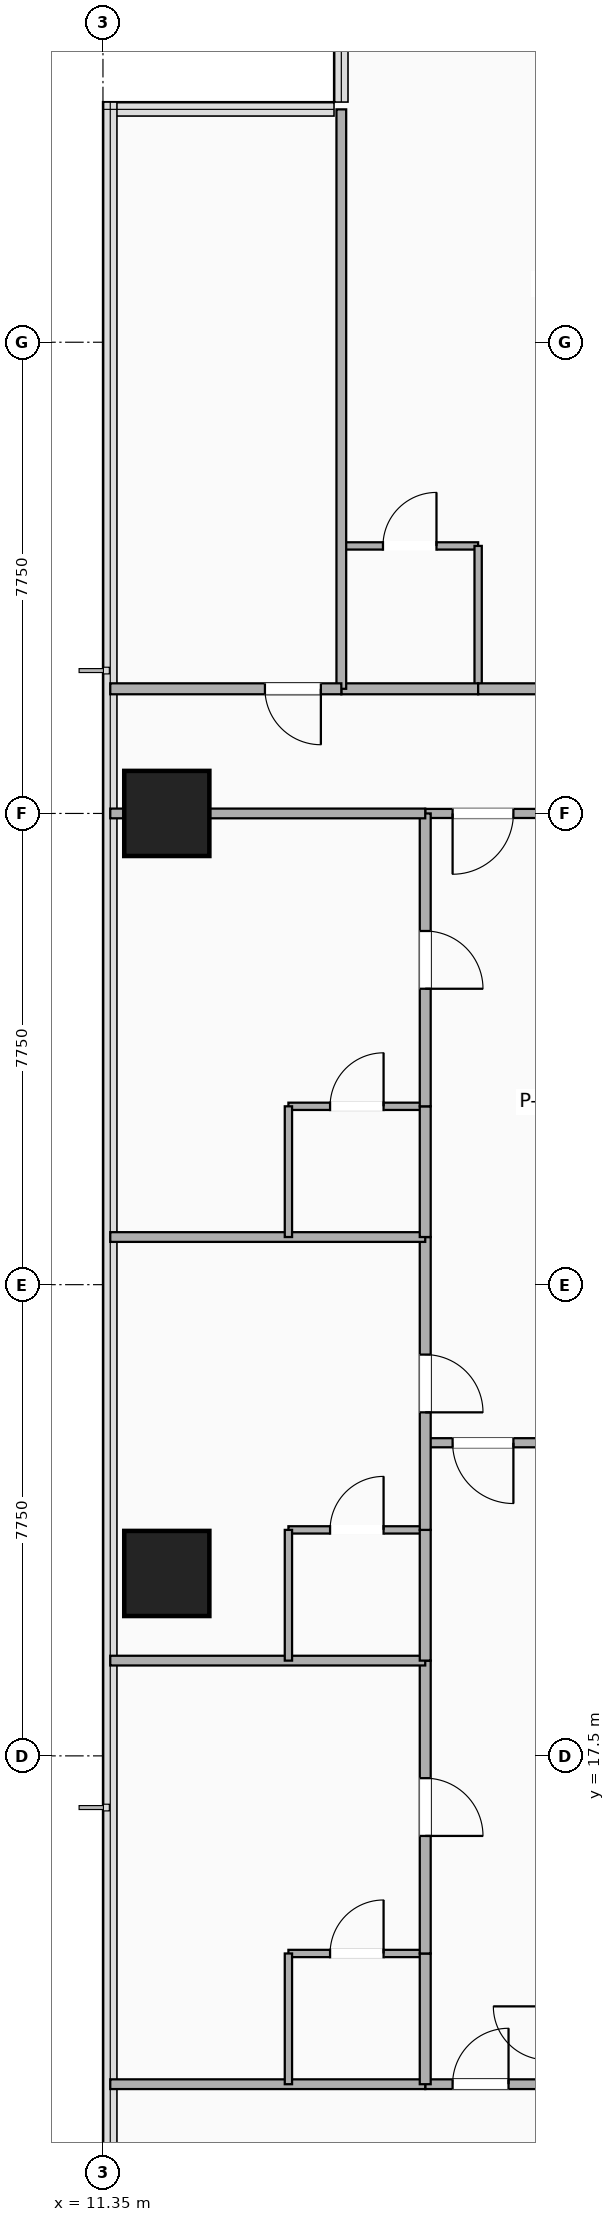
"""IFC4 building model, lengths in metres.
Left out: names, types, materials, properties, quantities, classifications, styles, units other than length and angle.
Written with IfcOpenShell. Run it as: python <this file> out.ifc"""

import sys

from ifc_helpers import new_model, si_unit, direction, frame, frame_2d, origin, origin_2d, place, context, subcontext, project, spatial, rectangle, extrude, element, fill, save


model = new_model("IFC4")
c1 = context("Model", 3, precision=1e-05, world=origin(), true_north=direction((0.0, 1.0)))
c2 = subcontext(c1, "Body", "Model", "MODEL_VIEW")
j1 = project(units=[si_unit("LENGTHUNIT", "METRE"), si_unit("PLANEANGLEUNIT", "RADIAN")], contexts=[c1])
p1 = place(None, origin())
s1 = spatial("IfcSite", under=j1, at=p1, CompositionType="ELEMENT")
p2 = place(p1, origin())
s2 = spatial("IfcBuilding", under=s1, at=p2, CompositionType="ELEMENT")
p3 = place(p2, frame((0.0, 0.0, 71.9)))
s3 = spatial("IfcBuildingStorey", under=s2, at=p3, CompositionType="ELEMENT", Elevation=71.9)
for number, where, z_axis, x_axis in (
    (1, (12.4, 20.5, -0.28), (0.0, 0.0, 1.0), (1.0, 0.0, 0.0)),
    (2, (12.4, 33.0, -0.28), (0.0, 0.0, 1.0), (1.0, 0.0, 0.0)),
):
    element("IfcColumn", number, at=place(p3, frame(where, z_axis=z_axis, x_axis=x_axis)), inside=s3, PredefinedType="COLUMN", context=c2, shape_type="SweptSolid", body=[
        extrude(rectangle(XDim=1.4, YDim=1.4, at=origin_2d()), origin(), (0.0, 0.0, 1.0), 3.46),
    ])
p4 = place(p3, frame((16.65, 12.1, 0.0), z_axis=(0.0, 0.0, 1.0), x_axis=(1.0, 0.0, 0.0)))
e3 = element("IfcWall", 3, at=p4, inside=s3, PredefinedType="PARTITIONING", context=c2, shape_type="SweptSolid", body=[
    extrude(rectangle(XDim=3.65, YDim=0.16, at=frame_2d((1.825, 0.0))), origin(), (0.0, 0.0, 1.0), 2.47),
])
p5 = place(p4, frame((1.37, 0.0, 0.0), z_axis=(0.0, 0.0, 1.0), x_axis=(-1.0, 0.0, 0.0)))
e4 = element("IfcOpeningElement", 4, at=p5, cuts=e3, PredefinedType="OPENING", context=c2, shape_type="SweptSolid", body=[
    extrude(rectangle(XDim=0.92, YDim=2.08, at=frame_2d((0.46, 1.04))), frame((0.0, 0.09, 0.0), z_axis=(0.0, -1.0, 0.0), x_axis=(1.0, 0.0, 0.0)), (0.0, 0.0, 1.0), 0.18),
])
p6 = place(p3, frame((16.65, 22.65, 0.0), z_axis=(0.0, 0.0, 1.0), x_axis=(1.0, 0.0, 0.0)))
e5 = element("IfcWall", 5, at=p6, inside=s3, PredefinedType="PARTITIONING", context=c2, shape_type="SweptSolid", body=[
    extrude(rectangle(XDim=2.0, YDim=0.15, at=frame_2d((1.0, 0.0))), origin(), (0.0, 0.0, 1.0), 3.18),
])
p7 = place(p6, frame((0.45, 0.0, 0.0)))
e6 = element("IfcOpeningElement", 6, at=p7, cuts=e5, PredefinedType="OPENING", context=c2, shape_type="SweptSolid", body=[
    extrude(rectangle(XDim=1.0, YDim=2.15, at=frame_2d((0.5, 1.075))), frame((0.0, 0.085, 0.0), z_axis=(0.0, -1.0, 0.0), x_axis=(1.0, 0.0, 0.0)), (0.0, 0.0, 1.0), 0.17),
])
p8 = place(p3, frame((16.65, 33.0, 0.0), z_axis=(0.0, 0.0, 1.0), x_axis=(1.0, 0.0, 0.0)))
e7 = element("IfcWall", 7, at=p8, inside=s3, PredefinedType="PARTITIONING", context=c2, shape_type="SweptSolid", body=[
    extrude(rectangle(XDim=2.0, YDim=0.15, at=frame_2d((1.0, 0.0))), origin(), (0.0, 0.0, 1.0), 2.47),
])
p9 = place(p8, frame((0.45, 0.0, 0.0)))
e8 = element("IfcOpeningElement", 8, at=p9, cuts=e7, PredefinedType="OPENING", context=c2, shape_type="SweptSolid", body=[
    extrude(rectangle(XDim=1.0, YDim=2.15, at=frame_2d((0.5, 1.075))), frame((0.0, 0.085, 0.0), z_axis=(0.0, -1.0, 0.0), x_axis=(1.0, 0.0, 0.0)), (0.0, 0.0, 1.0), 0.17),
])
p10 = place(p3, frame((15.27, 37.4, 0.0), z_axis=(0.0, 0.0, 1.0), x_axis=(1.0, 0.0, 0.0)))
e9 = element("IfcWall", 9, at=p10, inside=s3, PredefinedType="PARTITIONING", context=c2, shape_type="SweptSolid", body=[
    extrude(rectangle(XDim=2.25, YDim=0.12, at=frame_2d((1.125, 0.0))), origin(), (0.0, 0.0, 1.0), 3.18),
])
p11 = place(p10, frame((1.565, 0.0, 0.0), z_axis=(0.0, 0.0, 1.0), x_axis=(-1.0, 0.0, 0.0)))
e10 = element("IfcOpeningElement", 10, at=p11, cuts=e9, PredefinedType="OPENING", context=c2, shape_type="SweptSolid", body=[
    extrude(rectangle(XDim=0.88, YDim=2.08, at=frame_2d((0.44, 1.04))), frame((0.0, 0.07, 0.0), z_axis=(0.0, -1.0, 0.0), x_axis=(1.0, 0.0, 0.0)), (0.0, 0.0, 1.0), 0.14),
])
p12 = place(p3, frame((17.52, 35.05, 0.0), z_axis=(0.0, 0.0, 1.0), x_axis=(0.0, 1.0, 0.0)))
e11 = element("IfcWall", 11, at=p12, inside=s3, PredefinedType="PARTITIONING", context=c2, shape_type="SweptSolid", body=[
    extrude(rectangle(XDim=2.35, YDim=0.12, at=frame_2d((1.175, 0.0))), origin(), (0.0, 0.0, 1.0), 3.18),
])
p13 = place(p3, frame((15.27, 35.05, 0.0), z_axis=(0.0, 0.0, 1.0), x_axis=(1.0, 0.0, 0.0)))
e12 = element("IfcWall", 12, at=p13, inside=s3, PredefinedType="PARTITIONING", context=c2, shape_type="SweptSolid", body=[
    extrude(rectangle(XDim=2.25, YDim=0.18, at=frame_2d((1.125, 0.0))), origin(), (0.0, 0.0, 1.0), 3.18),
])
p14 = place(p3, frame((17.52, 35.05, 0.0), z_axis=(0.0, 0.0, 1.0), x_axis=(1.0, 0.0, 0.0)))
e13 = element("IfcWall", 13, at=p14, inside=s3, PredefinedType="PARTITIONING", context=c2, shape_type="SweptSolid", body=[
    extrude(rectangle(XDim=6.131, YDim=0.18, at=frame_2d((3.065, 0.0))), origin(), (0.0, 0.0, 1.0), 2.47),
])
p15 = place(p14, frame((2.591, 0.0, 0.0)))
e14 = element("IfcOpeningElement", 14, at=p15, cuts=e13, PredefinedType="OPENING", context=c2, shape_type="SweptSolid", body=[
    extrude(rectangle(XDim=0.95, YDim=2.15, at=frame_2d((0.475, 1.075))), frame((0.0, 0.1, 0.0), z_axis=(0.0, -1.0, 0.0), x_axis=(1.0, 0.0, 0.0)), (0.0, 0.0, 1.0), 0.2),
])
p16 = place(p3, frame((15.27, 35.05, 0.0), z_axis=(0.0, 0.0, 1.0), x_axis=(0.0, 1.0, 0.0)))
e15 = element("IfcWall", 15, at=p16, inside=s3, PredefinedType="PARTITIONING", context=c2, shape_type="SweptSolid", body=[
    extrude(rectangle(XDim=9.53, YDim=0.16, at=frame_2d((4.765, 0.0))), origin(), (0.0, 0.0, 1.0), 3.18),
])
p17 = place(p3, frame((11.47, 12.1, 0.0), z_axis=(0.0, 0.0, 1.0), x_axis=(1.0, 0.0, 0.0)))
e16 = element("IfcWall", 16, at=p17, inside=s3, PredefinedType="PARTITIONING", context=c2, shape_type="SweptSolid", body=[
    extrude(rectangle(XDim=5.18, YDim=0.16, at=frame_2d((2.59, 0.0))), origin(), (0.0, 0.0, 1.0), 2.543),
])
p18 = place(p3, frame((14.4, 14.25, 0.0), z_axis=(0.0, 0.0, 1.0), x_axis=(1.0, 0.0, 0.0)))
e17 = element("IfcWall", 17, at=p18, inside=s3, PredefinedType="PARTITIONING", context=c2, shape_type="SweptSolid", body=[
    extrude(rectangle(XDim=2.25, YDim=0.12, at=frame_2d((1.125, 0.0))), origin(), (0.0, 0.0, 1.0), 3.18),
])
p19 = place(p18, frame((1.565, 0.0, 0.0), z_axis=(0.0, 0.0, 1.0), x_axis=(-1.0, 0.0, 0.0)))
e18 = element("IfcOpeningElement", 18, at=p19, cuts=e17, PredefinedType="OPENING", context=c2, shape_type="SweptSolid", body=[
    extrude(rectangle(XDim=0.88, YDim=2.08, at=frame_2d((0.44, 1.04))), frame((0.0, 0.07, 0.0), z_axis=(0.0, -1.0, 0.0), x_axis=(1.0, 0.0, 0.0)), (0.0, 0.0, 1.0), 0.14),
])
p20 = place(p3, frame((14.4, 12.1, 0.0), z_axis=(0.0, 0.0, 1.0), x_axis=(0.0, 1.0, 0.0)))
e19 = element("IfcWall", 19, at=p20, inside=s3, PredefinedType="PARTITIONING", context=c2, shape_type="SweptSolid", body=[
    extrude(rectangle(XDim=2.15, YDim=0.12, at=frame_2d((1.075, 0.0))), origin(), (0.0, 0.0, 1.0), 2.862),
])
p21 = place(p3, frame((16.65, 12.1, 0.0), z_axis=(0.0, 0.0, 1.0), x_axis=(0.0, 1.0, 0.0)))
e20 = element("IfcWall", 20, at=p21, inside=s3, PredefinedType="PARTITIONING", context=c2, shape_type="SweptSolid", body=[
    extrude(rectangle(XDim=2.15, YDim=0.18, at=frame_2d((1.075, 0.0))), origin(), (0.0, 0.0, 1.0), 2.862),
])
p22 = place(p3, frame((16.65, 14.25, 0.0), z_axis=(0.0, 0.0, 1.0), x_axis=(0.0, 1.0, 0.0)))
e21 = element("IfcWall", 21, at=p22, inside=s3, PredefinedType="PARTITIONING", context=c2, shape_type="SweptSolid", body=[
    extrude(rectangle(XDim=4.817, YDim=0.18, at=frame_2d((2.408, 0.0))), origin(), (0.0, 0.0, 1.0), 2.862),
])
p23 = place(p22, frame((1.933, 0.0, 0.0)))
e22 = element("IfcOpeningElement", 22, at=p23, cuts=e21, PredefinedType="OPENING", context=c2, shape_type="SweptSolid", body=[
    extrude(rectangle(XDim=0.95, YDim=2.15, at=frame_2d((0.475, 1.075))), frame((0.0, 0.1, 0.0), z_axis=(0.0, -1.0, 0.0), x_axis=(1.0, 0.0, 0.0)), (0.0, 0.0, 1.0), 0.2),
])
p24 = place(p3, frame((11.47, 19.067, 0.0), z_axis=(0.0, 0.0, 1.0), x_axis=(1.0, 0.0, 0.0)))
e23 = element("IfcWall", 23, at=p24, inside=s3, PredefinedType="PARTITIONING", context=c2, shape_type="SweptSolid", body=[
    extrude(rectangle(XDim=5.18, YDim=0.16, at=frame_2d((2.59, 0.0))), origin(), (0.0, 0.0, 1.0), 2.543),
])
p25 = place(p3, frame((14.4, 21.217, 0.0), z_axis=(0.0, 0.0, 1.0), x_axis=(1.0, 0.0, 0.0)))
e24 = element("IfcWall", 24, at=p25, inside=s3, PredefinedType="PARTITIONING", context=c2, shape_type="SweptSolid", body=[
    extrude(rectangle(XDim=2.25, YDim=0.12, at=frame_2d((1.125, 0.0))), origin(), (0.0, 0.0, 1.0), 3.18),
])
p26 = place(p25, frame((1.565, 0.0, 0.0), z_axis=(0.0, 0.0, 1.0), x_axis=(-1.0, 0.0, 0.0)))
e25 = element("IfcOpeningElement", 25, at=p26, cuts=e24, PredefinedType="OPENING", context=c2, shape_type="SweptSolid", body=[
    extrude(rectangle(XDim=0.88, YDim=2.08, at=frame_2d((0.44, 1.04))), frame((0.0, 0.07, 0.0), z_axis=(0.0, -1.0, 0.0), x_axis=(1.0, 0.0, 0.0)), (0.0, 0.0, 1.0), 0.14),
])
p27 = place(p3, frame((14.4, 19.067, 0.0), z_axis=(0.0, 0.0, 1.0), x_axis=(0.0, 1.0, 0.0)))
e26 = element("IfcWall", 26, at=p27, inside=s3, PredefinedType="PARTITIONING", context=c2, shape_type="SweptSolid", body=[
    extrude(rectangle(XDim=2.15, YDim=0.12, at=frame_2d((1.075, 0.0))), origin(), (0.0, 0.0, 1.0), 2.47),
])
p28 = place(p3, frame((16.65, 19.067, 0.0), z_axis=(0.0, 0.0, 1.0), x_axis=(0.0, 1.0, 0.0)))
e27 = element("IfcWall", 27, at=p28, inside=s3, PredefinedType="PARTITIONING", context=c2, shape_type="SweptSolid", body=[
    extrude(rectangle(XDim=2.15, YDim=0.18, at=frame_2d((1.075, 0.0))), origin(), (0.0, 0.0, 1.0), 2.47),
])
p29 = place(p3, frame((16.65, 21.217, 0.0), z_axis=(0.0, 0.0, 1.0), x_axis=(0.0, 1.0, 0.0)))
e28 = element("IfcWall", 28, at=p29, inside=s3, PredefinedType="PARTITIONING", context=c2, shape_type="SweptSolid", body=[
    extrude(rectangle(XDim=4.816, YDim=0.18, at=frame_2d((2.408, 0.0))), origin(), (0.0, 0.0, 1.0), 2.748),
])
p30 = place(p29, frame((1.933, 0.0, 0.0)))
e29 = element("IfcOpeningElement", 29, at=p30, cuts=e28, PredefinedType="OPENING", context=c2, shape_type="SweptSolid", body=[
    extrude(rectangle(XDim=0.95, YDim=2.15, at=frame_2d((0.475, 1.075))), frame((0.0, 0.1, 0.0), z_axis=(0.0, -1.0, 0.0), x_axis=(1.0, 0.0, 0.0)), (0.0, 0.0, 1.0), 0.2),
])
p31 = place(p3, frame((11.47, 26.033, 0.0), z_axis=(0.0, 0.0, 1.0), x_axis=(1.0, 0.0, 0.0)))
e30 = element("IfcWall", 30, at=p31, inside=s3, PredefinedType="PARTITIONING", context=c2, shape_type="SweptSolid", body=[
    extrude(rectangle(XDim=5.18, YDim=0.16, at=frame_2d((2.59, 0.0))), origin(), (0.0, 0.0, 1.0), 2.543),
])
p32 = place(p3, frame((14.4, 28.183, 0.0), z_axis=(0.0, 0.0, 1.0), x_axis=(1.0, 0.0, 0.0)))
e31 = element("IfcWall", 31, at=p32, inside=s3, PredefinedType="PARTITIONING", context=c2, shape_type="SweptSolid", body=[
    extrude(rectangle(XDim=2.25, YDim=0.12, at=frame_2d((1.125, 0.0))), origin(), (0.0, 0.0, 1.0), 3.18),
])
p33 = place(p32, frame((1.565, 0.0, 0.0), z_axis=(0.0, 0.0, 1.0), x_axis=(-1.0, 0.0, 0.0)))
e32 = element("IfcOpeningElement", 32, at=p33, cuts=e31, PredefinedType="OPENING", context=c2, shape_type="SweptSolid", body=[
    extrude(rectangle(XDim=0.88, YDim=2.08, at=frame_2d((0.44, 1.04))), frame((0.0, 0.07, 0.0), z_axis=(0.0, -1.0, 0.0), x_axis=(1.0, 0.0, 0.0)), (0.0, 0.0, 1.0), 0.14),
])
p34 = place(p3, frame((14.4, 26.033, 0.0), z_axis=(0.0, 0.0, 1.0), x_axis=(0.0, 1.0, 0.0)))
e33 = element("IfcWall", 33, at=p34, inside=s3, PredefinedType="PARTITIONING", context=c2, shape_type="SweptSolid", body=[
    extrude(rectangle(XDim=2.15, YDim=0.12, at=frame_2d((1.075, 0.0))), origin(), (0.0, 0.0, 1.0), 3.18),
])
p35 = place(p3, frame((16.65, 26.033, 0.0), z_axis=(0.0, 0.0, 1.0), x_axis=(0.0, 1.0, 0.0)))
e34 = element("IfcWall", 34, at=p35, inside=s3, PredefinedType="PARTITIONING", context=c2, shape_type="SweptSolid", body=[
    extrude(rectangle(XDim=2.15, YDim=0.18, at=frame_2d((1.075, 0.0))), origin(), (0.0, 0.0, 1.0), 3.18),
])
p36 = place(p3, frame((16.65, 28.183, 0.0), z_axis=(0.0, 0.0, 1.0), x_axis=(0.0, 1.0, 0.0)))
e35 = element("IfcWall", 35, at=p36, inside=s3, PredefinedType="PARTITIONING", context=c2, shape_type="SweptSolid", body=[
    extrude(rectangle(XDim=4.817, YDim=0.18, at=frame_2d((2.408, 0.0))), origin(), (0.0, 0.0, 1.0), 2.47),
])
p37 = place(p36, frame((1.933, 0.0, 0.0)))
e36 = element("IfcOpeningElement", 36, at=p37, cuts=e35, PredefinedType="OPENING", context=c2, shape_type="SweptSolid", body=[
    extrude(rectangle(XDim=0.95, YDim=2.15, at=frame_2d((0.475, 1.075))), frame((0.0, 0.1, 0.0), z_axis=(0.0, -1.0, 0.0), x_axis=(1.0, 0.0, 0.0)), (0.0, 0.0, 1.0), 0.2),
])
p38 = place(p3, frame((11.47, 33.0, 0.0), z_axis=(0.0, 0.0, 1.0), x_axis=(1.0, 0.0, 0.0)))
e37 = element("IfcWall", 37, at=p38, inside=s3, PredefinedType="PARTITIONING", context=c2, shape_type="SweptSolid", body=[
    extrude(rectangle(XDim=5.18, YDim=0.16, at=frame_2d((2.59, 0.0))), origin(), (0.0, 0.0, 1.0), 2.47),
])
p39 = place(p3, frame((11.47, 35.05, 0.0), z_axis=(0.0, 0.0, 1.0), x_axis=(1.0, 0.0, 0.0)))
e38 = element("IfcWall", 38, at=p39, inside=s3, PredefinedType="PARTITIONING", context=c2, shape_type="SweptSolid", body=[
    extrude(rectangle(XDim=3.8, YDim=0.18, at=frame_2d((1.9, 0.0))), origin(), (0.0, 0.0, 1.0), 3.18),
])
p40 = place(p39, frame((2.544, 0.0, 0.0)))
e39 = element("IfcOpeningElement", 39, at=p40, cuts=e38, PredefinedType="OPENING", context=c2, shape_type="SweptSolid", body=[
    extrude(rectangle(XDim=0.92, YDim=2.08, at=frame_2d((0.46, 1.04))), frame((0.0, 0.1, 0.0), z_axis=(0.0, -1.0, 0.0), x_axis=(1.0, 0.0, 0.0)), (0.0, 0.0, 1.0), 0.2),
])
p41 = place(p5, origin())
e40 = element("IfcDoor", 40, at=p41, inside=s3, OperationType="SINGLE_SWING_RIGHT", PredefinedType="DOOR", context=c2, shape_type="SweptSolid", body=[
    extrude(rectangle(XDim=0.92, YDim=2.08, at=frame_2d((0.46, 1.04))), frame((0.0, 0.025, 0.0), z_axis=(0.0, -1.0, 0.0), x_axis=(1.0, 0.0, 0.0)), (0.0, 0.0, 1.0), 0.05),
])
fill(e4, e40)
p42 = place(p7, origin())
e41 = element("IfcDoor", 41, at=p42, inside=s3, OperationType="SINGLE_SWING_RIGHT", PredefinedType="DOOR", context=c2, shape_type="SweptSolid", body=[
    extrude(rectangle(XDim=1.0, YDim=2.15, at=frame_2d((0.5, 1.075))), frame((0.0, 0.025, 0.0), z_axis=(0.0, -1.0, 0.0), x_axis=(1.0, 0.0, 0.0)), (0.0, 0.0, 1.0), 0.05),
])
fill(e6, e41)
p43 = place(p9, origin())
e42 = element("IfcDoor", 42, at=p43, inside=s3, OperationType="SINGLE_SWING_LEFT", PredefinedType="DOOR", context=c2, shape_type="SweptSolid", body=[
    extrude(rectangle(XDim=1.0, YDim=2.15, at=frame_2d((0.5, 1.075))), frame((0.0, 0.025, 0.0), z_axis=(0.0, -1.0, 0.0), x_axis=(1.0, 0.0, 0.0)), (0.0, 0.0, 1.0), 0.05),
])
fill(e8, e42)
p44 = place(p11, origin())
e43 = element("IfcDoor", 43, at=p44, inside=s3, OperationType="SINGLE_SWING_RIGHT", PredefinedType="DOOR", context=c2, shape_type="SweptSolid", body=[
    extrude(rectangle(XDim=0.88, YDim=2.08, at=frame_2d((0.44, 1.04))), frame((0.0, 0.025, 0.0), z_axis=(0.0, -1.0, 0.0), x_axis=(1.0, 0.0, 0.0)), (0.0, 0.0, 1.0), 0.05),
])
fill(e10, e43)
p45 = place(p19, origin())
e44 = element("IfcDoor", 44, at=p45, inside=s3, OperationType="SINGLE_SWING_RIGHT", PredefinedType="DOOR", context=c2, shape_type="SweptSolid", body=[
    extrude(rectangle(XDim=0.88, YDim=2.08, at=frame_2d((0.44, 1.04))), frame((0.0, 0.025, 0.0), z_axis=(0.0, -1.0, 0.0), x_axis=(1.0, 0.0, 0.0)), (0.0, 0.0, 1.0), 0.05),
])
fill(e18, e44)
p46 = place(p23, origin())
e45 = element("IfcDoor", 45, at=p46, inside=s3, OperationType="SINGLE_SWING_LEFT", PredefinedType="DOOR", context=c2, shape_type="SweptSolid", body=[
    extrude(rectangle(XDim=0.95, YDim=2.15, at=frame_2d((0.475, 1.075))), frame((0.0, 0.025, 0.0), z_axis=(0.0, -1.0, 0.0), x_axis=(1.0, 0.0, 0.0)), (0.0, 0.0, 1.0), 0.05),
])
fill(e22, e45)
p47 = place(p26, origin())
e46 = element("IfcDoor", 46, at=p47, inside=s3, OperationType="SINGLE_SWING_RIGHT", PredefinedType="DOOR", context=c2, shape_type="SweptSolid", body=[
    extrude(rectangle(XDim=0.88, YDim=2.08, at=frame_2d((0.44, 1.04))), frame((0.0, 0.025, 0.0), z_axis=(0.0, -1.0, 0.0), x_axis=(1.0, 0.0, 0.0)), (0.0, 0.0, 1.0), 0.05),
])
fill(e25, e46)
p48 = place(p30, origin())
e47 = element("IfcDoor", 47, at=p48, inside=s3, OperationType="SINGLE_SWING_LEFT", PredefinedType="DOOR", context=c2, shape_type="SweptSolid", body=[
    extrude(rectangle(XDim=0.95, YDim=2.15, at=frame_2d((0.475, 1.075))), frame((0.0, 0.025, 0.0), z_axis=(0.0, -1.0, 0.0), x_axis=(1.0, 0.0, 0.0)), (0.0, 0.0, 1.0), 0.05),
])
fill(e29, e47)
p49 = place(p33, origin())
e48 = element("IfcDoor", 48, at=p49, inside=s3, OperationType="SINGLE_SWING_RIGHT", PredefinedType="DOOR", context=c2, shape_type="SweptSolid", body=[
    extrude(rectangle(XDim=0.88, YDim=2.08, at=frame_2d((0.44, 1.04))), frame((0.0, 0.025, 0.0), z_axis=(0.0, -1.0, 0.0), x_axis=(1.0, 0.0, 0.0)), (0.0, 0.0, 1.0), 0.05),
])
fill(e32, e48)
p50 = place(p37, origin())
e49 = element("IfcDoor", 49, at=p50, inside=s3, OperationType="SINGLE_SWING_LEFT", PredefinedType="DOOR", context=c2, shape_type="SweptSolid", body=[
    extrude(rectangle(XDim=0.95, YDim=2.15, at=frame_2d((0.475, 1.075))), frame((0.0, 0.025, 0.0), z_axis=(0.0, -1.0, 0.0), x_axis=(1.0, 0.0, 0.0)), (0.0, 0.0, 1.0), 0.05),
])
fill(e36, e49)
p51 = place(p40, origin())
e50 = element("IfcDoor", 50, at=p51, inside=s3, OperationType="SINGLE_SWING_RIGHT", PredefinedType="DOOR", context=c2, shape_type="SweptSolid", body=[
    extrude(rectangle(XDim=0.92, YDim=2.08, at=frame_2d((0.46, 1.04))), frame((0.0, 0.025, 0.0), z_axis=(0.0, -1.0, 0.0), x_axis=(1.0, 0.0, 0.0)), (0.0, 0.0, 1.0), 0.05),
])
fill(e39, e50)
save(model, sys.argv[1])
